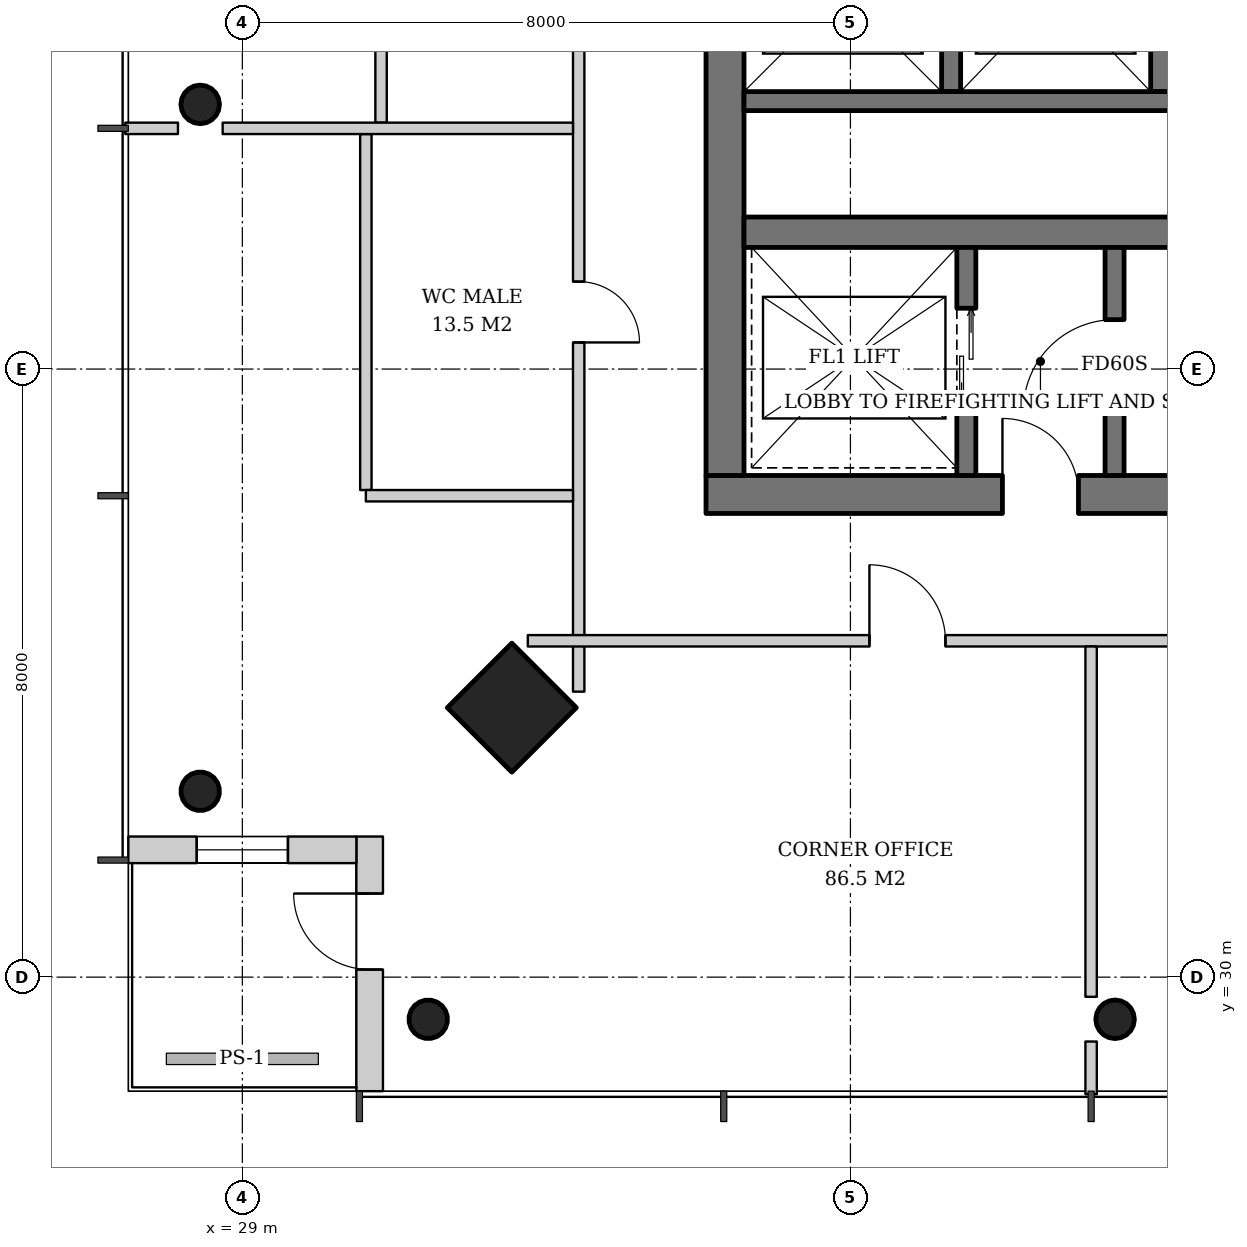
"""IFC4 building model, lengths in metres.
Left out: names, types, materials, properties, quantities, classifications, styles, units other than length and angle.
Written with IfcOpenShell. Run it as: python <this file> out.ifc"""

import sys

from ifc_helpers import new_model, si_unit, direction, frame, frame_2d, origin, origin_2d, place, context, subcontext, project, spatial, rectangle, hollow_circle, extrude, element, fill, save


model = new_model("IFC4")
c1 = context("Model", 3, precision=1e-05, world=origin(), true_north=direction((0.0, 1.0)))
c2 = subcontext(c1, "Body", "Model", "MODEL_VIEW")
j1 = project(units=[si_unit("LENGTHUNIT", "METRE"), si_unit("PLANEANGLEUNIT", "RADIAN")], contexts=[c1])
p1 = place(None, origin())
s1 = spatial("IfcSite", under=j1, at=p1, CompositionType="ELEMENT")
p2 = place(p1, origin())
s2 = spatial("IfcBuilding", under=s1, at=p2, CompositionType="ELEMENT")
p3 = place(p2, frame((0.0, 0.0, 252.8)))
s3 = spatial("IfcBuildingStorey", under=s2, at=p3, CompositionType="ELEMENT", Elevation=252.8)
p4 = place(p3, frame((32.507, 33.507, 0.0), z_axis=(0.031962158256, 0.031962158256, 0.998977898093), x_axis=(-0.707106781187, 0.707106781187, 0.0)))
e1 = element("IfcColumn", 1, at=p4, inside=s3, PredefinedType="COLUMN", context=c2, shape_type="SweptSolid", body=[
    extrude(rectangle(XDim=1.2, YDim=1.2, at=origin_2d()), origin(), (0.0, 0.0, 1.0), 3.804),
])
p5 = place(p3, frame((28.407, 32.407, 0.0), z_axis=(0.031898107953, 0.031898107953, 0.998981992539), x_axis=(-0.707106781187, 0.707106781187, 0.0)))
e2 = element("IfcColumn", 2, at=p5, inside=s3, PredefinedType="COLUMN", context=c2, shape_type="SweptSolid", body=[
    extrude(hollow_circle(Radius=0.254, WallThickness=0.02, at=origin_2d()), origin(), (0.0, 0.0, 1.0), 3.804),
])
p6 = place(p3, frame((28.407, 41.469, 0.0), z_axis=(0.031912535354, 0.010658915229, 0.999433828532), x_axis=(-0.316800238982, 0.948492281772, 0.0)))
e3 = element("IfcColumn", 3, at=p6, inside=s3, PredefinedType="COLUMN", context=c2, shape_type="SweptSolid", body=[
    extrude(hollow_circle(Radius=0.254, WallThickness=0.02, at=origin_2d()), origin(), (0.0, 0.0, 1.0), 3.802),
])
p7 = place(p3, frame((31.407, 29.407, 0.0), z_axis=(0.031898107953, 0.031898107953, 0.998981992539), x_axis=(-0.707106781187, 0.707106781187, 0.0)))
e4 = element("IfcColumn", 4, at=p7, inside=s3, PredefinedType="COLUMN", context=c2, shape_type="SweptSolid", body=[
    extrude(hollow_circle(Radius=0.254, WallThickness=0.02, at=origin_2d()), origin(), (0.0, 0.0, 1.0), 3.804),
])
p8 = place(p3, frame((40.469, 29.407, 0.0), z_axis=(0.010658915229, 0.031912535354, 0.999433828532), x_axis=(-0.948492281772, 0.316800238982, 0.0)))
e5 = element("IfcColumn", 5, at=p8, inside=s3, PredefinedType="COLUMN", context=c2, shape_type="SweptSolid", body=[
    extrude(hollow_circle(Radius=0.254, WallThickness=0.02, at=origin_2d()), origin(), (0.0, 0.0, 1.0), 3.802),
])
p9 = place(p3, frame((35.1, 36.35, 0.0), z_axis=(0.0, 0.0, 1.0), x_axis=(1.0, 0.0, 0.0)))
e6 = element("IfcWall", 6, at=p9, inside=s3, PredefinedType="SHEAR", context=c2, shape_type="SweptSolid", body=[
    extrude(rectangle(XDim=19.8, YDim=0.5, at=frame_2d((9.9, 0.0))), origin(), (0.0, 0.0, 1.0), 3.8),
])
p10 = place(p9, frame((3.9, 0.0, 0.0)))
e7 = element("IfcOpeningElement", 7, at=p10, cuts=e6, PredefinedType="OPENING", context=c2, shape_type="SweptSolid", body=[
    extrude(rectangle(XDim=1.0, YDim=2.1, at=frame_2d((0.5, 1.05))), frame((0.0, 0.26, 0.0), z_axis=(0.0, -1.0, 0.0), x_axis=(1.0, 0.0, 0.0)), (0.0, 0.0, 1.0), 0.52),
])
p11 = place(p9, frame((15.35, 0.0, 0.0)))
e8 = element("IfcOpeningElement", 8, at=p11, cuts=e6, PredefinedType="OPENING", context=c2, shape_type="SweptSolid", body=[
    extrude(rectangle(XDim=1.0, YDim=2.1, at=frame_2d((0.5, 1.05))), frame((0.0, 0.26, 0.0), z_axis=(0.0, -1.0, 0.0), x_axis=(1.0, 0.0, 0.0)), (0.0, 0.0, 1.0), 0.52),
])
p12 = place(p3, frame((35.35, 36.6, 0.0), z_axis=(0.0, 0.0, 1.0), x_axis=(0.0, 1.0, 0.0)))
e9 = element("IfcWall", 9, at=p12, inside=s3, PredefinedType="SHEAR", context=c2, shape_type="SweptSolid", body=[
    extrude(rectangle(XDim=18.8, YDim=0.5, at=frame_2d((9.4, 0.0))), origin(), (0.0, 0.0, 1.0), 3.8),
])
p13 = place(p12, frame((8.5, 0.0, 0.0)))
e10 = element("IfcOpeningElement", 10, at=p13, cuts=e9, PredefinedType="OPENING", context=c2, shape_type="SweptSolid", body=[
    extrude(rectangle(XDim=1.8, YDim=2.4, at=frame_2d((0.9, 1.2))), frame((0.0, 0.26, 0.0), z_axis=(0.0, -1.0, 0.0), x_axis=(1.0, 0.0, 0.0)), (0.0, 0.0, 1.0), 0.52),
])
p14 = place(p3, frame((35.6, 39.8, 0.0), z_axis=(0.0, 0.0, 1.0), x_axis=(1.0, 0.0, 0.0)))
e11 = element("IfcWall", 11, at=p14, inside=s3, PredefinedType="SHEAR", context=c2, shape_type="SweptSolid", body=[
    extrude(rectangle(XDim=18.8, YDim=0.4, at=frame_2d((9.4, 0.0))), origin(), (0.0, 0.0, 1.0), 3.8),
])
p15 = place(p3, frame((30.675, 28.5, 0.0), z_axis=(0.0, 0.0, 1.0), x_axis=(0.0, 1.0, 0.0)))
e12 = element("IfcWall", 12, at=p15, inside=s3, PredefinedType="SOLIDWALL", context=c2, shape_type="SweptSolid", body=[
    extrude(rectangle(XDim=3.35, YDim=0.35, at=frame_2d((1.675, 0.0))), origin(), (0.0, 0.0, 1.0), 3.62),
])
p16 = place(p15, frame((1.6, 0.0, 0.0)))
e13 = element("IfcOpeningElement", 13, at=p16, cuts=e12, PredefinedType="OPENING", context=c2, shape_type="SweptSolid", body=[
    extrude(rectangle(XDim=1.0, YDim=2.4, at=frame_2d((0.5, 1.2))), frame((0.0, 0.185, 0.0), z_axis=(0.0, -1.0, 0.0), x_axis=(1.0, 0.0, 0.0)), (0.0, 0.0, 1.0), 0.37),
])
p17 = place(p3, frame((30.5, 31.675, 0.0), z_axis=(0.0, 0.0, 1.0), x_axis=(-1.0, 0.0, 0.0)))
e14 = element("IfcWall", 14, at=p17, inside=s3, PredefinedType="SOLIDWALL", context=c2, shape_type="SweptSolid", body=[
    extrude(rectangle(XDim=3.0, YDim=0.35, at=frame_2d((1.5, 0.0))), origin(), (0.0, 0.0, 1.0), 3.62),
])
p18 = place(p17, frame((0.9, 0.0, 0.6)))
e15 = element("IfcOpeningElement", 15, at=p18, cuts=e14, PredefinedType="OPENING", context=c2, shape_type="SweptSolid", body=[
    extrude(rectangle(XDim=1.2, YDim=2.55, at=frame_2d((0.6, 1.275))), frame((0.0, 0.185, 0.0), z_axis=(0.0, -1.0, 0.0), x_axis=(1.0, 0.0, 0.0)), (0.0, 0.0, 1.0), 0.37),
])
p19 = place(p3, frame((38.525, 36.6, 0.0), z_axis=(0.0, 0.0, 1.0), x_axis=(0.0, 1.0, 0.0)))
e16 = element("IfcWall", 16, at=p19, inside=s3, PredefinedType="SHEAR", context=c2, shape_type="SweptSolid", body=[
    extrude(rectangle(XDim=3.0, YDim=0.25, at=frame_2d((1.5, 0.0))), origin(), (0.0, 0.0, 1.0), 3.8),
])
p20 = place(p19, frame((0.9, 0.0, 0.0)))
e17 = element("IfcOpeningElement", 17, at=p20, cuts=e16, PredefinedType="OPENING", context=c2, shape_type="SweptSolid", body=[
    extrude(rectangle(XDim=1.3, YDim=2.2, at=frame_2d((0.65, 1.1))), frame((0.0, 0.135, 0.0), z_axis=(0.0, -1.0, 0.0), x_axis=(1.0, 0.0, 0.0)), (0.0, 0.0, 1.0), 0.27),
])
p21 = place(p3, frame((40.475, 36.6, 0.0), z_axis=(0.0, 0.0, 1.0), x_axis=(0.0, 1.0, 0.0)))
e18 = element("IfcWall", 18, at=p21, inside=s3, PredefinedType="SHEAR", context=c2, shape_type="SweptSolid", body=[
    extrude(rectangle(XDim=3.0, YDim=0.25, at=frame_2d((1.5, 0.0))), origin(), (0.0, 0.0, 1.0), 3.8),
])
p22 = place(p21, frame((0.85, 0.0, 0.0)))
e19 = element("IfcOpeningElement", 19, at=p22, cuts=e18, PredefinedType="OPENING", context=c2, shape_type="SweptSolid", body=[
    extrude(rectangle(XDim=1.2, YDim=2.1, at=frame_2d((0.6, 1.05))), frame((0.0, 0.135, 0.0), z_axis=(0.0, -1.0, 0.0), x_axis=(1.0, 0.0, 0.0)), (0.0, 0.0, 1.0), 0.27),
])
for number, where, z_axis, x_axis in (
    (20, (38.325, 44.25, 0.0), (0.0, 0.0, 1.0), (0.0, -1.0, 0.0)),
    (21, (41.075, 44.25, 0.0), (0.0, 0.0, 1.0), (0.0, -1.0, 0.0)),
):
    element("IfcWall", number, at=place(p3, frame(where, z_axis=z_axis, x_axis=x_axis)), inside=s3, PredefinedType="SHEAR", context=c2, shape_type="SweptSolid", body=[
        extrude(rectangle(XDim=2.6, YDim=0.25, at=frame_2d((1.3, 0.0))), origin(), (0.0, 0.0, 1.0), 3.8),
    ])
p23 = place(p3, frame((35.6, 41.525, 0.0), z_axis=(0.0, 0.0, 1.0), x_axis=(1.0, 0.0, 0.0)))
e22 = element("IfcWall", 22, at=p23, inside=s3, PredefinedType="SHEAR", context=c2, shape_type="SweptSolid", body=[
    extrude(rectangle(XDim=11.1, YDim=0.25, at=frame_2d((5.55, 0.0))), origin(), (0.0, 0.0, 1.0), 3.8),
])
p24 = place(p3, frame((30.825, 45.925, 0.0), z_axis=(0.0, 0.0, 1.0), x_axis=(0.0, -1.0, 0.0)))
e23 = element("IfcWall", 23, at=p24, inside=s3, PredefinedType="PARTITIONING", context=c2, shape_type="SweptSolid", body=[
    extrude(rectangle(XDim=4.683, YDim=0.15, at=frame_2d((2.342, 0.0))), origin(), (0.0, 0.0, 1.0), 3.12),
])
p25 = place(p3, frame((30.625, 41.092, 0.0), z_axis=(0.0, 0.0, 1.0), x_axis=(0.0, -1.0, 0.0)))
e24 = element("IfcWall", 24, at=p25, inside=s3, PredefinedType="PARTITIONING", context=c2, shape_type="SweptSolid", body=[
    extrude(rectangle(XDim=4.683, YDim=0.15, at=frame_2d((2.342, 0.0))), origin(), (0.0, 0.0, 1.0), 3.12),
])
p26 = place(p3, frame((33.425, 58.244, 0.0), z_axis=(0.0, 0.0, 1.0), x_axis=(0.0, -1.0, 0.0)))
e25 = element("IfcWall", 25, at=p26, inside=s3, PredefinedType="PARTITIONING", context=c2, shape_type="SweptSolid", body=[
    extrude(rectangle(XDim=24.489, YDim=0.15, at=frame_2d((12.244, 0.0))), origin(), (0.0, 0.0, 1.0), 3.02),
])
p27 = place(p26, frame((4.494, 0.0, 0.0)))
e26 = element("IfcOpeningElement", 26, at=p27, cuts=e25, PredefinedType="OPENING", context=c2, shape_type="SweptSolid", body=[
    extrude(rectangle(XDim=1.0, YDim=2.1, at=frame_2d((0.5, 1.05))), frame((0.0, 0.085, 0.0), z_axis=(0.0, -1.0, 0.0), x_axis=(1.0, 0.0, 0.0)), (0.0, 0.0, 1.0), 0.17),
])
p28 = place(p26, frame((9.428, 0.0, 0.0)))
e27 = element("IfcOpeningElement", 27, at=p28, cuts=e25, PredefinedType="OPENING", context=c2, shape_type="SweptSolid", body=[
    extrude(rectangle(XDim=0.8, YDim=2.1, at=frame_2d((0.4, 1.05))), frame((0.0, 0.085, 0.0), z_axis=(0.0, -1.0, 0.0), x_axis=(1.0, 0.0, 0.0)), (0.0, 0.0, 1.0), 0.17),
])
p29 = place(p26, frame((14.161, 0.0, 0.0)))
e28 = element("IfcOpeningElement", 28, at=p29, cuts=e25, PredefinedType="OPENING", context=c2, shape_type="SweptSolid", body=[
    extrude(rectangle(XDim=1.0, YDim=2.1, at=frame_2d((0.5, 1.05))), frame((0.0, 0.085, 0.0), z_axis=(0.0, -1.0, 0.0), x_axis=(1.0, 0.0, 0.0)), (0.0, 0.0, 1.0), 0.17),
])
p30 = place(p26, frame((19.094, 0.0, 0.0)))
e29 = element("IfcOpeningElement", 29, at=p30, cuts=e25, PredefinedType="OPENING", context=c2, shape_type="SweptSolid", body=[
    extrude(rectangle(XDim=0.8, YDim=2.1, at=frame_2d((0.4, 1.05))), frame((0.0, 0.085, 0.0), z_axis=(0.0, -1.0, 0.0), x_axis=(1.0, 0.0, 0.0)), (0.0, 0.0, 1.0), 0.17),
])
p31 = place(p3, frame((33.35, 41.167, 0.0), z_axis=(0.0, 0.0, 1.0), x_axis=(-1.0, 0.0, 0.0)))
e30 = element("IfcWall", 30, at=p31, inside=s3, PredefinedType="PARTITIONING", context=c2, shape_type="SweptSolid", body=[
    extrude(rectangle(XDim=4.609, YDim=0.15, at=frame_2d((2.305, 0.0))), origin(), (0.0, 0.0, 1.0), 3.62),
])
p32 = place(p3, frame((28.153, 41.167, 0.0), z_axis=(0.0, 0.0, 1.0), x_axis=(-1.0, 0.0, 0.0)))
e31 = element("IfcWall", 31, at=p32, inside=s3, PredefinedType="PARTITIONING", context=c2, shape_type="SweptSolid", body=[
    extrude(rectangle(XDim=0.693, YDim=0.15, at=frame_2d((0.347, 0.0))), origin(), (0.0, 0.0, 1.0), 3.62),
])
p33 = place(p3, frame((33.35, 36.333, 0.0), z_axis=(0.0, 0.0, 1.0), x_axis=(-1.0, 0.0, 0.0)))
e32 = element("IfcWall", 32, at=p33, inside=s3, PredefinedType="PARTITIONING", context=c2, shape_type="SweptSolid", body=[
    extrude(rectangle(XDim=2.725, YDim=0.15, at=frame_2d((1.363, 0.0))), origin(), (0.0, 0.0, 1.0), 3.62),
])
p34 = place(p3, frame((32.756, 34.425, 0.0), z_axis=(0.0, 0.0, 1.0), x_axis=(1.0, 0.0, 0.0)))
e33 = element("IfcWall", 33, at=p34, inside=s3, PredefinedType="PARTITIONING", context=c2, shape_type="SweptSolid", body=[
    extrude(rectangle(XDim=24.489, YDim=0.15, at=frame_2d((12.244, 0.0))), origin(), (0.0, 0.0, 1.0), 3.02),
])
p35 = place(p34, frame((4.494, 0.0, 0.0)))
e34 = element("IfcOpeningElement", 34, at=p35, cuts=e33, PredefinedType="OPENING", context=c2, shape_type="SweptSolid", body=[
    extrude(rectangle(XDim=1.0, YDim=2.1, at=frame_2d((0.5, 1.05))), frame((0.0, 0.085, 0.0), z_axis=(0.0, -1.0, 0.0), x_axis=(1.0, 0.0, 0.0)), (0.0, 0.0, 1.0), 0.17),
])
p36 = place(p34, frame((9.328, 0.0, 0.0)))
e35 = element("IfcOpeningElement", 35, at=p36, cuts=e33, PredefinedType="OPENING", context=c2, shape_type="SweptSolid", body=[
    extrude(rectangle(XDim=1.0, YDim=2.1, at=frame_2d((0.5, 1.05))), frame((0.0, 0.085, 0.0), z_axis=(0.0, -1.0, 0.0), x_axis=(1.0, 0.0, 0.0)), (0.0, 0.0, 1.0), 0.17),
])
p37 = place(p34, frame((14.161, 0.0, 0.0)))
e36 = element("IfcOpeningElement", 36, at=p37, cuts=e33, PredefinedType="OPENING", context=c2, shape_type="SweptSolid", body=[
    extrude(rectangle(XDim=1.0, YDim=2.1, at=frame_2d((0.5, 1.05))), frame((0.0, 0.085, 0.0), z_axis=(0.0, -1.0, 0.0), x_axis=(1.0, 0.0, 0.0)), (0.0, 0.0, 1.0), 0.17),
])
p38 = place(p34, frame((18.994, 0.0, 0.0)))
e37 = element("IfcOpeningElement", 37, at=p38, cuts=e33, PredefinedType="OPENING", context=c2, shape_type="SweptSolid", body=[
    extrude(rectangle(XDim=1.0, YDim=2.1, at=frame_2d((0.5, 1.05))), frame((0.0, 0.085, 0.0), z_axis=(0.0, -1.0, 0.0), x_axis=(1.0, 0.0, 0.0)), (0.0, 0.0, 1.0), 0.17),
])
p39 = place(p3, frame((40.167, 34.35, 0.0), z_axis=(0.0, 0.0, 1.0), x_axis=(0.0, -1.0, 0.0)))
e38 = element("IfcWall", 38, at=p39, inside=s3, PredefinedType="PARTITIONING", context=c2, shape_type="SweptSolid", body=[
    extrude(rectangle(XDim=4.609, YDim=0.15, at=frame_2d((2.305, 0.0))), origin(), (0.0, 0.0, 1.0), 3.62),
])
p40 = place(p3, frame((40.167, 29.153, 0.0), z_axis=(0.0, 0.0, 1.0), x_axis=(0.0, -1.0, 0.0)))
e39 = element("IfcWall", 39, at=p40, inside=s3, PredefinedType="PARTITIONING", context=c2, shape_type="SweptSolid", body=[
    extrude(rectangle(XDim=0.693, YDim=0.15, at=frame_2d((0.347, 0.0))), origin(), (0.0, 0.0, 1.0), 3.62),
])
p41 = place(p16, origin())
e40 = element("IfcDoor", 40, at=p41, inside=s3, OperationType="SINGLE_SWING_RIGHT", PredefinedType="DOOR", context=c2, shape_type="SweptSolid", body=[
    extrude(rectangle(XDim=1.0, YDim=2.4, at=frame_2d((0.5, 1.2))), frame((0.0, 0.025, 0.0), z_axis=(0.0, -1.0, 0.0), x_axis=(1.0, 0.0, 0.0)), (0.0, 0.0, 1.0), 0.05),
])
fill(e13, e40)
p42 = place(p18, origin())
e41 = element("IfcWindow", 41, at=p42, inside=s3, PartitioningType="SINGLE_PANEL", PredefinedType="WINDOW", context=c2, shape_type="SweptSolid", body=[
    extrude(rectangle(XDim=1.2, YDim=2.55, at=frame_2d((0.6, 1.275))), frame((0.0, 0.03, 0.0), z_axis=(0.0, -1.0, 0.0), x_axis=(1.0, 0.0, 0.0)), (0.0, 0.0, 1.0), 0.06),
])
fill(e15, e41)
p43 = place(p20, origin())
e42 = element("IfcDoor", 42, at=p43, inside=s3, OperationType="DOUBLE_DOOR_SLIDING", PredefinedType="DOOR", context=c2, shape_type="SweptSolid", body=[
    extrude(rectangle(XDim=1.3, YDim=2.2, at=frame_2d((0.65, 1.1))), frame((0.0, 0.025, 0.0), z_axis=(0.0, -1.0, 0.0), x_axis=(1.0, 0.0, 0.0)), (0.0, 0.0, 1.0), 0.05),
])
fill(e17, e42)
p44 = place(p22, origin())
e43 = element("IfcDoor", 43, at=p44, inside=s3, OperationType="SINGLE_SWING_LEFT", PredefinedType="DOOR", context=c2, shape_type="SweptSolid", body=[
    extrude(rectangle(XDim=1.2, YDim=2.1, at=frame_2d((0.6, 1.05))), frame((0.0, 0.025, 0.0), z_axis=(0.0, -1.0, 0.0), x_axis=(1.0, 0.0, 0.0)), (0.0, 0.0, 1.0), 0.05),
])
fill(e19, e43)
p45 = place(p10, origin())
e44 = element("IfcDoor", 44, at=p45, inside=s3, OperationType="SINGLE_SWING_LEFT", PredefinedType="DOOR", context=c2, shape_type="SweptSolid", body=[
    extrude(rectangle(XDim=1.0, YDim=2.1, at=frame_2d((0.5, 1.05))), frame((0.0, 0.025, 0.0), z_axis=(0.0, -1.0, 0.0), x_axis=(1.0, 0.0, 0.0)), (0.0, 0.0, 1.0), 0.05),
])
fill(e7, e44)
p46 = place(p30, origin())
e45 = element("IfcDoor", 45, at=p46, inside=s3, OperationType="SINGLE_SWING_RIGHT", PredefinedType="DOOR", context=c2, shape_type="SweptSolid", body=[
    extrude(rectangle(XDim=0.8, YDim=2.1, at=frame_2d((0.4, 1.05))), frame((0.0, 0.025, 0.0), z_axis=(0.0, -1.0, 0.0), x_axis=(1.0, 0.0, 0.0)), (0.0, 0.0, 1.0), 0.05),
])
fill(e29, e45)
p47 = place(p35, origin())
e46 = element("IfcDoor", 46, at=p47, inside=s3, OperationType="SINGLE_SWING_LEFT", PredefinedType="DOOR", context=c2, shape_type="SweptSolid", body=[
    extrude(rectangle(XDim=1.0, YDim=2.1, at=frame_2d((0.5, 1.05))), frame((0.0, 0.025, 0.0), z_axis=(0.0, -1.0, 0.0), x_axis=(1.0, 0.0, 0.0)), (0.0, 0.0, 1.0), 0.05),
])
fill(e34, e46)
save(model, sys.argv[1])
